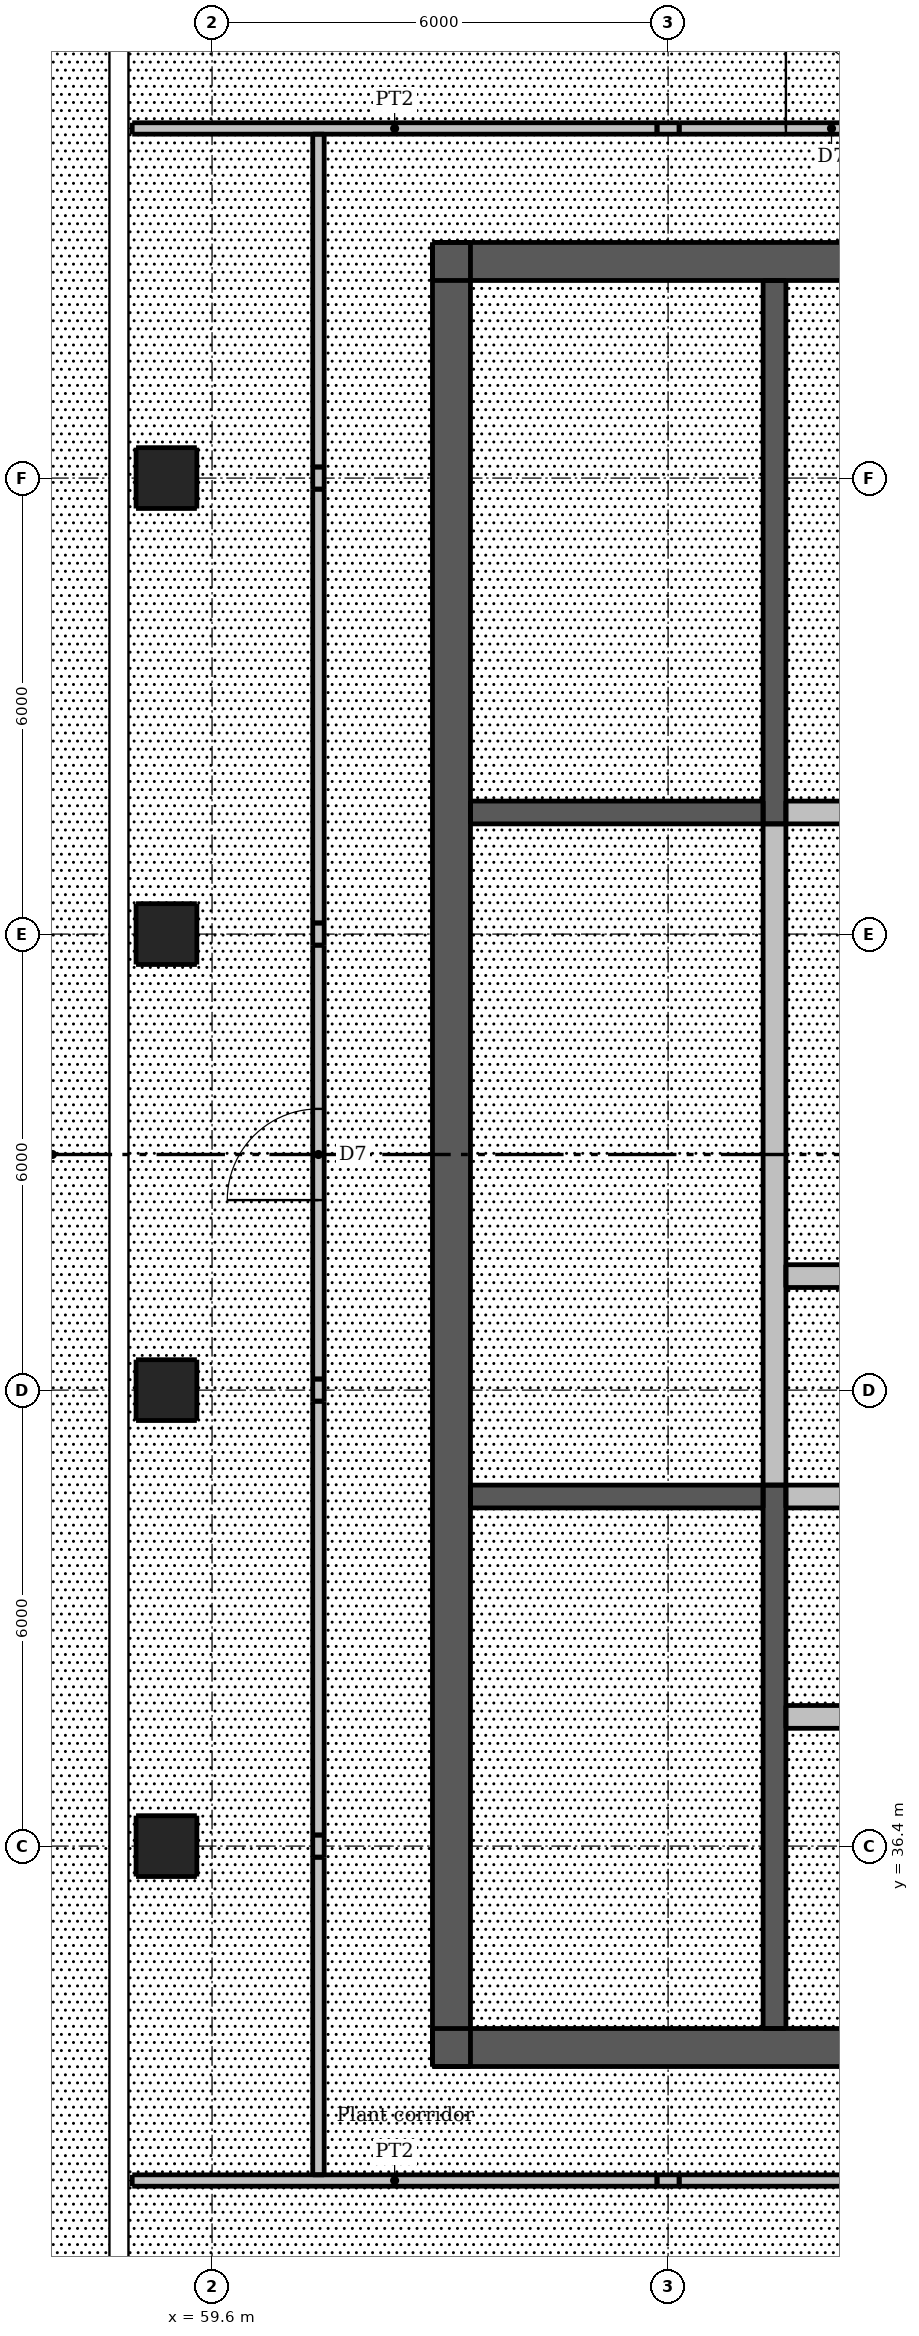
"""IFC4 building model, lengths in metres.
Left out: names, types, materials, properties, quantities, classifications, styles, units other than length and angle.
Written with IfcOpenShell. Run it as: python <this file> out.ifc"""

import sys

from ifc_helpers import new_model, si_unit, direction, frame, frame_2d, origin, origin_2d, place, context, subcontext, project, spatial, rectangle, extrude, element, fill, save


model = new_model("IFC4")
c1 = context("Model", 3, precision=1e-05, world=origin(), true_north=direction((0.0, 1.0)))
c2 = subcontext(c1, "Body", "Model", "MODEL_VIEW")
j1 = project(units=[si_unit("LENGTHUNIT", "METRE"), si_unit("PLANEANGLEUNIT", "RADIAN")], contexts=[c1])
p1 = place(None, origin())
s1 = spatial("IfcSite", under=j1, at=p1, CompositionType="ELEMENT")
p2 = place(p1, origin())
s2 = spatial("IfcBuilding", under=s1, at=p2, CompositionType="ELEMENT")
p3 = place(p2, frame((0.0, 0.0, 294.4)))
s3 = spatial("IfcBuildingStorey", under=s2, at=p3, CompositionType="ELEMENT", Elevation=294.4)
p4 = place(p3, frame((62.5, 33.75, 0.0), z_axis=(0.0, 0.0, 1.0), x_axis=(1.0, 0.0, 0.0)))
e1 = element("IfcWall", 1, at=p4, inside=s3, PredefinedType="SHEAR", context=c2, shape_type="SweptSolid", body=[
    extrude(rectangle(XDim=24.0, YDim=0.5, at=frame_2d((12.0, 0.0))), origin(), (0.0, 0.0, 1.0), 3.3),
])
p5 = place(p4, frame((1.875, 0.0, 0.0)))
e2 = element("IfcOpeningElement", 2, at=p5, cuts=e1, PredefinedType="OPENING", context=c2, shape_type="SweptSolid", body=[
    extrude(rectangle(XDim=1.1, YDim=2.1, at=frame_2d((0.55, 1.05))), frame((0.0, 0.26, 0.0), z_axis=(0.0, -1.0, 0.0), x_axis=(1.0, 0.0, 0.0)), (0.0, 0.0, 1.0), 0.52),
])
p6 = place(p4, frame((21.025, 0.0, 0.0)))
e3 = element("IfcOpeningElement", 3, at=p6, cuts=e1, PredefinedType="OPENING", context=c2, shape_type="SweptSolid", body=[
    extrude(rectangle(XDim=1.1, YDim=2.1, at=frame_2d((0.55, 1.05))), frame((0.0, 0.26, 0.0), z_axis=(0.0, -1.0, 0.0), x_axis=(1.0, 0.0, 0.0)), (0.0, 0.0, 1.0), 0.52),
])
p7 = place(p4, frame((11.55, 0.0, 0.0)))
e4 = element("IfcOpeningElement", 4, at=p7, cuts=e1, PredefinedType="OPENING", context=c2, shape_type="SweptSolid", body=[
    extrude(rectangle(XDim=0.9, YDim=2.1, at=frame_2d((0.45, 1.05))), frame((0.0, 0.26, 0.0), z_axis=(0.0, -1.0, 0.0), x_axis=(1.0, 0.0, 0.0)), (0.0, 0.0, 1.0), 0.52),
])
p8 = place(p3, frame((62.5, 57.25, 0.0), z_axis=(0.0, 0.0, 1.0), x_axis=(1.0, 0.0, 0.0)))
e5 = element("IfcWall", 5, at=p8, inside=s3, PredefinedType="SHEAR", context=c2, shape_type="SweptSolid", body=[
    extrude(rectangle(XDim=24.0, YDim=0.5, at=frame_2d((12.0, 0.0))), origin(), (0.0, 0.0, 1.0), 3.3),
])
p9 = place(p8, frame((21.025, 0.0, 0.0)))
e6 = element("IfcOpeningElement", 6, at=p9, cuts=e5, PredefinedType="OPENING", context=c2, shape_type="SweptSolid", body=[
    extrude(rectangle(XDim=1.1, YDim=2.1, at=frame_2d((0.55, 1.05))), frame((0.0, 0.26, 0.0), z_axis=(0.0, -1.0, 0.0), x_axis=(1.0, 0.0, 0.0)), (0.0, 0.0, 1.0), 0.52),
])
p10 = place(p8, frame((1.875, 0.0, 0.0)))
e7 = element("IfcOpeningElement", 7, at=p10, cuts=e5, PredefinedType="OPENING", context=c2, shape_type="SweptSolid", body=[
    extrude(rectangle(XDim=1.1, YDim=2.1, at=frame_2d((0.55, 1.05))), frame((0.0, 0.26, 0.0), z_axis=(0.0, -1.0, 0.0), x_axis=(1.0, 0.0, 0.0)), (0.0, 0.0, 1.0), 0.52),
])
p11 = place(p8, frame((11.55, 0.0, 0.0)))
e8 = element("IfcOpeningElement", 8, at=p11, cuts=e5, PredefinedType="OPENING", context=c2, shape_type="SweptSolid", body=[
    extrude(rectangle(XDim=0.9, YDim=2.1, at=frame_2d((0.45, 1.05))), frame((0.0, 0.26, 0.0), z_axis=(0.0, -1.0, 0.0), x_axis=(1.0, 0.0, 0.0)), (0.0, 0.0, 1.0), 0.52),
])
p12 = place(p3, frame((62.75, 33.5, 0.0), z_axis=(0.0, 0.0, 1.0), x_axis=(0.0, 1.0, 0.0)))
e9 = element("IfcWall", 9, at=p12, inside=s3, PredefinedType="SHEAR", context=c2, shape_type="SweptSolid", body=[
    extrude(rectangle(XDim=24.0, YDim=0.5, at=frame_2d((12.0, 0.0))), origin(), (0.0, 0.0, 1.0), 3.3),
])
p13 = place(p12, frame((11.55, 0.0, 0.0)))
e10 = element("IfcOpeningElement", 10, at=p13, cuts=e9, PredefinedType="OPENING", context=c2, shape_type="SweptSolid", body=[
    extrude(rectangle(XDim=0.9, YDim=2.1, at=frame_2d((0.45, 1.05))), frame((0.0, 0.26, 0.0), z_axis=(0.0, -1.0, 0.0), x_axis=(1.0, 0.0, 0.0)), (0.0, 0.0, 1.0), 0.52),
])
for number, where, z_axis, x_axis in (
    (11, (59.0, 36.4, 0.0), (0.0, 0.0, 1.0), (1.0, 0.0, 0.0)),
    (12, (59.0, 42.4, 0.0), (0.0, 0.0, 1.0), (1.0, 0.0, 0.0)),
    (13, (59.0, 48.4, 0.0), (0.0, 0.0, 1.0), (1.0, 0.0, 0.0)),
    (14, (59.0, 54.4, 0.0), (0.0, 0.0, 1.0), (1.0, 0.0, 0.0)),
):
    element("IfcColumn", number, at=place(p3, frame(where, z_axis=z_axis, x_axis=x_axis)), inside=s3, PredefinedType="COLUMN", context=c2, shape_type="SweptSolid", body=[
        extrude(rectangle(XDim=0.8, YDim=0.8, at=origin_2d()), origin(), (0.0, 0.0, 1.0), 3.3),
    ])
p14 = place(p3, frame((67.0, 34.0, 0.0), z_axis=(0.0, 0.0, 1.0), x_axis=(0.0, 1.0, 0.0)))
e15 = element("IfcWall", 15, at=p14, inside=s3, PredefinedType="SHEAR", context=c2, shape_type="SweptSolid", body=[
    extrude(rectangle(XDim=7.15, YDim=0.3, at=frame_2d((3.575, 0.0))), origin(), (0.0, 0.0, 1.0), 3.3),
])
p15 = place(p14, frame((0.2, 0.0, 0.0)))
e16 = element("IfcOpeningElement", 16, at=p15, cuts=e15, PredefinedType="OPENING", context=c2, shape_type="SweptSolid", body=[
    extrude(rectangle(XDim=1.1, YDim=2.1, at=frame_2d((0.55, 1.05))), frame((0.0, 0.16, 0.0), z_axis=(0.0, -1.0, 0.0), x_axis=(1.0, 0.0, 0.0)), (0.0, 0.0, 1.0), 0.32),
])
p16 = place(p3, frame((67.0, 41.15, 0.0), z_axis=(0.0, 0.0, 1.0), x_axis=(0.0, 1.0, 0.0)))
e17 = element("IfcWall", 17, at=p16, inside=s3, PredefinedType="PARTITIONING", context=c2, shape_type="SweptSolid", body=[
    extrude(rectangle(XDim=8.7, YDim=0.3, at=frame_2d((4.35, 0.0))), origin(), (0.0, 0.0, 1.0), 3.3),
])
p17 = place(p16, frame((3.9, 0.0, 0.0)))
e18 = element("IfcOpeningElement", 18, at=p17, cuts=e17, PredefinedType="OPENING", context=c2, shape_type="SweptSolid", body=[
    extrude(rectangle(XDim=0.9, YDim=2.1, at=frame_2d((0.45, 1.05))), frame((0.0, 0.16, 0.0), z_axis=(0.0, -1.0, 0.0), x_axis=(1.0, 0.0, 0.0)), (0.0, 0.0, 1.0), 0.32),
])
p18 = place(p3, frame((67.0, 49.85, 0.0), z_axis=(0.0, 0.0, 1.0), x_axis=(0.0, 1.0, 0.0)))
e19 = element("IfcWall", 19, at=p18, inside=s3, PredefinedType="SHEAR", context=c2, shape_type="SweptSolid", body=[
    extrude(rectangle(XDim=7.15, YDim=0.3, at=frame_2d((3.575, 0.0))), origin(), (0.0, 0.0, 1.0), 3.3),
])
p19 = place(p18, frame((5.85, 0.0, 0.0)))
e20 = element("IfcOpeningElement", 20, at=p19, cuts=e19, PredefinedType="OPENING", context=c2, shape_type="SweptSolid", body=[
    extrude(rectangle(XDim=1.1, YDim=2.1, at=frame_2d((0.55, 1.05))), frame((0.0, 0.16, 0.0), z_axis=(0.0, -1.0, 0.0), x_axis=(1.0, 0.0, 0.0)), (0.0, 0.0, 1.0), 0.32),
])
for number, where, z_axis, x_axis in (
    (21, (63.0, 41.0, 0.0), (0.0, 0.0, 1.0), (1.0, 0.0, 0.0)),
    (22, (63.0, 50.0, 0.0), (0.0, 0.0, 1.0), (1.0, 0.0, 0.0)),
):
    element("IfcWall", number, at=place(p3, frame(where, z_axis=z_axis, x_axis=x_axis)), inside=s3, PredefinedType="SHEAR", context=c2, shape_type="SweptSolid", body=[
        extrude(rectangle(XDim=3.85, YDim=0.3, at=frame_2d((1.925, 0.0))), origin(), (0.0, 0.0, 1.0), 3.3),
    ])
p20 = place(p3, frame((67.15, 50.0, 0.0), z_axis=(0.0, 0.0, 1.0), x_axis=(1.0, 0.0, 0.0)))
e23 = element("IfcWall", 23, at=p20, inside=s3, PredefinedType="PARTITIONING", context=c2, shape_type="SweptSolid", body=[
    extrude(rectangle(XDim=14.7, YDim=0.3, at=frame_2d((7.35, 0.0))), origin(), (0.0, 0.0, 1.0), 3.3),
])
p21 = place(p20, frame((6.9, 0.0, 0.0)))
e24 = element("IfcOpeningElement", 24, at=p21, cuts=e23, PredefinedType="OPENING", context=c2, shape_type="SweptSolid", body=[
    extrude(rectangle(XDim=0.9, YDim=2.1, at=frame_2d((0.45, 1.05))), frame((0.0, 0.16, 0.0), z_axis=(0.0, -1.0, 0.0), x_axis=(1.0, 0.0, 0.0)), (0.0, 0.0, 1.0), 0.32),
])
p22 = place(p3, frame((67.15, 43.9, 0.0), z_axis=(0.0, 0.0, 1.0), x_axis=(1.0, 0.0, 0.0)))
e25 = element("IfcWall", 25, at=p22, inside=s3, PredefinedType="PARTITIONING", context=c2, shape_type="SweptSolid", body=[
    extrude(rectangle(XDim=4.85, YDim=0.3, at=frame_2d((2.425, 0.0))), origin(), (0.0, 0.0, 1.0), 3.3),
])
p23 = place(p22, frame((1.9, 0.0, 0.0)))
e26 = element("IfcOpeningElement", 26, at=p23, cuts=e25, PredefinedType="OPENING", context=c2, shape_type="SweptSolid", body=[
    extrude(rectangle(XDim=0.9, YDim=2.1, at=frame_2d((0.45, 1.05))), frame((0.0, 0.16, 0.0), z_axis=(0.0, -1.0, 0.0), x_axis=(1.0, 0.0, 0.0)), (0.0, 0.0, 1.0), 0.32),
])
p24 = place(p3, frame((67.15, 38.1, 0.0), z_axis=(0.0, 0.0, 1.0), x_axis=(1.0, 0.0, 0.0)))
e27 = element("IfcWall", 27, at=p24, inside=s3, PredefinedType="PARTITIONING", context=c2, shape_type="SweptSolid", body=[
    extrude(rectangle(XDim=7.2, YDim=0.3, at=frame_2d((3.6, 0.0))), origin(), (0.0, 0.0, 1.0), 3.3),
])
p25 = place(p24, frame((0.55, 0.0, 0.0)))
e28 = element("IfcOpeningElement", 28, at=p25, cuts=e27, PredefinedType="OPENING", context=c2, shape_type="SweptSolid", body=[
    extrude(rectangle(XDim=1.1, YDim=2.1, at=frame_2d((0.55, 1.05))), frame((0.0, 0.16, 0.0), z_axis=(0.0, -1.0, 0.0), x_axis=(1.0, 0.0, 0.0)), (0.0, 0.0, 1.0), 0.32),
])
p26 = place(p24, frame((3.05, 0.0, 0.0)))
e29 = element("IfcOpeningElement", 29, at=p26, cuts=e27, PredefinedType="OPENING", context=c2, shape_type="SweptSolid", body=[
    extrude(rectangle(XDim=1.1, YDim=2.1, at=frame_2d((0.55, 1.05))), frame((0.0, 0.16, 0.0), z_axis=(0.0, -1.0, 0.0), x_axis=(1.0, 0.0, 0.0)), (0.0, 0.0, 1.0), 0.32),
])
p27 = place(p24, frame((5.5, 0.0, 0.0)))
e30 = element("IfcOpeningElement", 30, at=p27, cuts=e27, PredefinedType="OPENING", context=c2, shape_type="SweptSolid", body=[
    extrude(rectangle(XDim=1.2, YDim=2.1, at=frame_2d((0.6, 1.05))), frame((0.0, 0.16, 0.0), z_axis=(0.0, -1.0, 0.0), x_axis=(1.0, 0.0, 0.0)), (0.0, 0.0, 1.0), 0.32),
])
p28 = place(p3, frame((67.15, 41.0, 0.0), z_axis=(0.0, 0.0, 1.0), x_axis=(1.0, 0.0, 0.0)))
e31 = element("IfcWall", 31, at=p28, inside=s3, PredefinedType="PARTITIONING", context=c2, shape_type="SweptSolid", body=[
    extrude(rectangle(XDim=7.2, YDim=0.3, at=frame_2d((3.6, 0.0))), origin(), (0.0, 0.0, 1.0), 3.3),
])
p29 = place(p3, frame((58.55, 32.0, 0.0), z_axis=(0.0, 0.0, 1.0), x_axis=(1.0, 0.0, 0.0)))
e32 = element("IfcWall", 32, at=p29, inside=s3, PredefinedType="PARTITIONING", context=c2, shape_type="SweptSolid", body=[
    extrude(rectangle(XDim=6.904, YDim=0.15, at=frame_2d((3.452, 0.0))), origin(), (0.0, 0.0, 1.0), 3.3),
])
p30 = place(p3, frame((65.454, 32.0, 0.0), z_axis=(0.0, 0.0, 1.0), x_axis=(1.0, 0.0, 0.0)))
e33 = element("IfcWall", 33, at=p30, inside=s3, PredefinedType="PARTITIONING", context=c2, shape_type="SweptSolid", body=[
    extrude(rectangle(XDim=0.292, YDim=0.15, at=frame_2d((0.146, 0.0))), origin(), (0.0, 0.0, 1.0), 2.465),
])
p31 = place(p3, frame((65.746, 32.0, 0.0), z_axis=(0.0, 0.0, 1.0), x_axis=(1.0, 0.0, 0.0)))
e34 = element("IfcWall", 34, at=p31, inside=s3, PredefinedType="PARTITIONING", context=c2, shape_type="SweptSolid", body=[
    extrude(rectangle(XDim=5.708, YDim=0.15, at=frame_2d((2.854, 0.0))), origin(), (0.0, 0.0, 1.0), 3.3),
])
p32 = place(p3, frame((58.55, 59.0, 0.0), z_axis=(0.0, 0.0, 1.0), x_axis=(1.0, 0.0, 0.0)))
e35 = element("IfcWall", 35, at=p32, inside=s3, PredefinedType="PARTITIONING", context=c2, shape_type="SweptSolid", body=[
    extrude(rectangle(XDim=6.904, YDim=0.15, at=frame_2d((3.452, 0.0))), origin(), (0.0, 0.0, 1.0), 3.3),
])
p33 = place(p3, frame((65.454, 59.0, 0.0), z_axis=(0.0, 0.0, 1.0), x_axis=(1.0, 0.0, 0.0)))
e36 = element("IfcWall", 36, at=p33, inside=s3, PredefinedType="PARTITIONING", context=c2, shape_type="SweptSolid", body=[
    extrude(rectangle(XDim=0.292, YDim=0.15, at=frame_2d((0.146, 0.0))), origin(), (0.0, 0.0, 1.0), 2.465),
])
p34 = place(p3, frame((65.746, 59.0, 0.0), z_axis=(0.0, 0.0, 1.0), x_axis=(1.0, 0.0, 0.0)))
e37 = element("IfcWall", 37, at=p34, inside=s3, PredefinedType="PARTITIONING", context=c2, shape_type="SweptSolid", body=[
    extrude(rectangle(XDim=5.708, YDim=0.15, at=frame_2d((2.854, 0.0))), origin(), (0.0, 0.0, 1.0), 3.3),
])
p35 = place(p34, frame((1.404, 0.0, 0.0)))
e38 = element("IfcOpeningElement", 38, at=p35, cuts=e37, PredefinedType="OPENING", context=c2, shape_type="SweptSolid", body=[
    extrude(rectangle(XDim=1.2, YDim=2.1, at=frame_2d((0.6, 1.05))), frame((0.0, 0.085, 0.0), z_axis=(0.0, -1.0, 0.0), x_axis=(1.0, 0.0, 0.0)), (0.0, 0.0, 1.0), 0.17),
])
p36 = place(p3, frame((61.0, 32.075, 0.0), z_axis=(0.0, 0.0, 1.0), x_axis=(0.0, 1.0, 0.0)))
e39 = element("IfcWall", 39, at=p36, inside=s3, PredefinedType="PARTITIONING", context=c2, shape_type="SweptSolid", body=[
    extrude(rectangle(XDim=4.179, YDim=0.15, at=frame_2d((2.09, 0.0))), origin(), (0.0, 0.0, 1.0), 3.3),
])
p37 = place(p3, frame((61.0, 36.254, 0.0), z_axis=(0.0, 0.0, 1.0), x_axis=(0.0, 1.0, 0.0)))
e40 = element("IfcWall", 40, at=p37, inside=s3, PredefinedType="PARTITIONING", context=c2, shape_type="SweptSolid", body=[
    extrude(rectangle(XDim=0.292, YDim=0.15, at=frame_2d((0.146, 0.0))), origin(), (0.0, 0.0, 1.0), 2.465),
])
p38 = place(p3, frame((61.0, 36.546, 0.0), z_axis=(0.0, 0.0, 1.0), x_axis=(0.0, 1.0, 0.0)))
e41 = element("IfcWall", 41, at=p38, inside=s3, PredefinedType="PARTITIONING", context=c2, shape_type="SweptSolid", body=[
    extrude(rectangle(XDim=5.708, YDim=0.15, at=frame_2d((2.854, 0.0))), origin(), (0.0, 0.0, 1.0), 3.3),
])
p39 = place(p3, frame((61.0, 42.254, 0.0), z_axis=(0.0, 0.0, 1.0), x_axis=(0.0, 1.0, 0.0)))
e42 = element("IfcWall", 42, at=p39, inside=s3, PredefinedType="PARTITIONING", context=c2, shape_type="SweptSolid", body=[
    extrude(rectangle(XDim=0.292, YDim=0.15, at=frame_2d((0.146, 0.0))), origin(), (0.0, 0.0, 1.0), 2.465),
])
p40 = place(p3, frame((61.0, 42.546, 0.0), z_axis=(0.0, 0.0, 1.0), x_axis=(0.0, 1.0, 0.0)))
e43 = element("IfcWall", 43, at=p40, inside=s3, PredefinedType="PARTITIONING", context=c2, shape_type="SweptSolid", body=[
    extrude(rectangle(XDim=5.708, YDim=0.15, at=frame_2d((2.854, 0.0))), origin(), (0.0, 0.0, 1.0), 3.3),
])
p41 = place(p40, frame((2.354, 0.0, 0.0)))
e44 = element("IfcOpeningElement", 44, at=p41, cuts=e43, PredefinedType="OPENING", context=c2, shape_type="SweptSolid", body=[
    extrude(rectangle(XDim=1.2, YDim=2.1, at=frame_2d((0.6, 1.05))), frame((0.0, 0.085, 0.0), z_axis=(0.0, -1.0, 0.0), x_axis=(1.0, 0.0, 0.0)), (0.0, 0.0, 1.0), 0.17),
])
p42 = place(p3, frame((61.0, 48.254, 0.0), z_axis=(0.0, 0.0, 1.0), x_axis=(0.0, 1.0, 0.0)))
e45 = element("IfcWall", 45, at=p42, inside=s3, PredefinedType="PARTITIONING", context=c2, shape_type="SweptSolid", body=[
    extrude(rectangle(XDim=0.292, YDim=0.15, at=frame_2d((0.146, 0.0))), origin(), (0.0, 0.0, 1.0), 2.465),
])
p43 = place(p3, frame((61.0, 48.546, 0.0), z_axis=(0.0, 0.0, 1.0), x_axis=(0.0, 1.0, 0.0)))
e46 = element("IfcWall", 46, at=p43, inside=s3, PredefinedType="PARTITIONING", context=c2, shape_type="SweptSolid", body=[
    extrude(rectangle(XDim=5.708, YDim=0.15, at=frame_2d((2.854, 0.0))), origin(), (0.0, 0.0, 1.0), 3.3),
])
p44 = place(p3, frame((61.0, 54.254, 0.0), z_axis=(0.0, 0.0, 1.0), x_axis=(0.0, 1.0, 0.0)))
e47 = element("IfcWall", 47, at=p44, inside=s3, PredefinedType="PARTITIONING", context=c2, shape_type="SweptSolid", body=[
    extrude(rectangle(XDim=0.292, YDim=0.15, at=frame_2d((0.146, 0.0))), origin(), (0.0, 0.0, 1.0), 2.465),
])
p45 = place(p3, frame((61.0, 54.546, 0.0), z_axis=(0.0, 0.0, 1.0), x_axis=(0.0, 1.0, 0.0)))
e48 = element("IfcWall", 48, at=p45, inside=s3, PredefinedType="PARTITIONING", context=c2, shape_type="SweptSolid", body=[
    extrude(rectangle(XDim=4.379, YDim=0.15, at=frame_2d((2.189, 0.0))), origin(), (0.0, 0.0, 1.0), 3.3),
])
p46 = place(p15, origin())
e49 = element("IfcDoor", 49, at=p46, inside=s3, OperationType="SINGLE_SWING_LEFT", PredefinedType="DOOR", context=c2, shape_type="SweptSolid", body=[
    extrude(rectangle(XDim=1.1, YDim=2.1, at=frame_2d((0.55, 1.05))), frame((0.0, 0.138, 0.0), z_axis=(0.0, -1.0, 0.0), x_axis=(1.0, 0.0, 0.0)), (0.0, 0.0, 1.0), 0.05),
])
fill(e16, e49)
p47 = place(p19, origin())
e50 = element("IfcDoor", 50, at=p47, inside=s3, OperationType="SINGLE_SWING_LEFT", PredefinedType="DOOR", context=c2, shape_type="SweptSolid", body=[
    extrude(rectangle(XDim=1.1, YDim=2.1, at=frame_2d((0.55, 1.05))), frame((0.0, 0.138, 0.0), z_axis=(0.0, -1.0, 0.0), x_axis=(1.0, 0.0, 0.0)), (0.0, 0.0, 1.0), 0.05),
])
fill(e20, e50)
p48 = place(p17, origin())
e51 = element("IfcDoor", 51, at=p48, inside=s3, OperationType="SINGLE_SWING_LEFT", PredefinedType="DOOR", context=c2, shape_type="SweptSolid", body=[
    extrude(rectangle(XDim=0.9, YDim=2.1, at=frame_2d((0.45, 1.05))), frame((0.0, 0.138, 0.0), z_axis=(0.0, -1.0, 0.0), x_axis=(1.0, 0.0, 0.0)), (0.0, 0.0, 1.0), 0.05),
])
fill(e18, e51)
p49 = place(p5, origin())
e52 = element("IfcDoor", 52, at=p49, inside=s3, OperationType="SINGLE_SWING_LEFT", PredefinedType="DOOR", context=c2, shape_type="SweptSolid", body=[
    extrude(rectangle(XDim=1.1, YDim=2.1, at=frame_2d((0.55, 1.05))), frame((0.0, 0.237, 0.0), z_axis=(0.0, -1.0, 0.0), x_axis=(1.0, 0.0, 0.0)), (0.0, 0.0, 1.0), 0.05),
])
fill(e2, e52)
p50 = place(p10, origin())
e53 = element("IfcDoor", 53, at=p50, inside=s3, OperationType="SINGLE_SWING_LEFT", PredefinedType="DOOR", context=c2, shape_type="SweptSolid", body=[
    extrude(rectangle(XDim=1.1, YDim=2.1, at=frame_2d((0.55, 1.05))), frame((0.0, -0.188, 0.0), z_axis=(0.0, -1.0, 0.0), x_axis=(1.0, 0.0, 0.0)), (0.0, 0.0, 1.0), 0.05),
])
fill(e7, e53)
p51 = place(p13, origin())
e54 = element("IfcDoor", 54, at=p51, inside=s3, OperationType="SINGLE_SWING_LEFT", PredefinedType="DOOR", context=c2, shape_type="SweptSolid", body=[
    extrude(rectangle(XDim=0.9, YDim=2.1, at=frame_2d((0.45, 1.05))), frame((0.0, -0.188, 0.0), z_axis=(0.0, -1.0, 0.0), x_axis=(1.0, 0.0, 0.0)), (0.0, 0.0, 1.0), 0.05),
])
fill(e10, e54)
p52 = place(p25, origin())
e55 = element("IfcDoor", 55, at=p52, inside=s3, OperationType="DOUBLE_DOOR_SLIDING", PredefinedType="DOOR", context=c2, shape_type="SweptSolid", body=[
    extrude(rectangle(XDim=1.1, YDim=2.1, at=frame_2d((0.55, 1.05))), frame((0.0, 0.025, 0.0), z_axis=(0.0, -1.0, 0.0), x_axis=(1.0, 0.0, 0.0)), (0.0, 0.0, 1.0), 0.05),
])
fill(e28, e55)
p53 = place(p35, origin())
e56 = element("IfcDoor", 56, at=p53, inside=s3, OperationType="SINGLE_SWING_LEFT", PredefinedType="DOOR", context=c2, shape_type="SweptSolid", body=[
    extrude(rectangle(XDim=1.2, YDim=2.1, at=frame_2d((0.6, 1.05))), frame((0.0, 0.025, 0.0), z_axis=(0.0, -1.0, 0.0), x_axis=(1.0, 0.0, 0.0)), (0.0, 0.0, 1.0), 0.05),
])
fill(e38, e56)
p54 = place(p41, origin())
e57 = element("IfcDoor", 57, at=p54, inside=s3, OperationType="SINGLE_SWING_LEFT", PredefinedType="DOOR", context=c2, shape_type="SweptSolid", body=[
    extrude(rectangle(XDim=1.2, YDim=2.1, at=frame_2d((0.6, 1.05))), frame((0.0, 0.025, 0.0), z_axis=(0.0, -1.0, 0.0), x_axis=(1.0, 0.0, 0.0)), (0.0, 0.0, 1.0), 0.05),
])
fill(e44, e57)
save(model, sys.argv[1])
